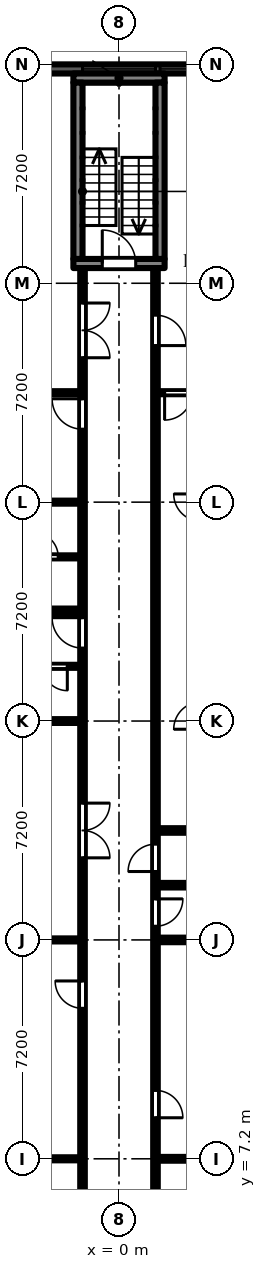
"""IFC4 building model, lengths in metres.
Left out: names, types, materials, properties, quantities, classifications, styles, units other than length and angle.
Written with IfcOpenShell. Run it as: python <this file> out.ifc"""

import sys

from ifc_helpers import new_model, si_unit, direction, frame, frame_2d, origin, place, context, subcontext, project, spatial, rectangle, extrude, element, fill, save


model = new_model("IFC4")
c1 = context("Model", 3, precision=1e-05, world=origin(), true_north=direction((0.0, 1.0)))
c2 = subcontext(c1, "Body", "Model", "MODEL_VIEW")
j1 = project(units=[si_unit("LENGTHUNIT", "METRE"), si_unit("PLANEANGLEUNIT", "RADIAN")], contexts=[c1])
p1 = place(None, origin())
s1 = spatial("IfcSite", under=j1, at=p1, CompositionType="ELEMENT")
p2 = place(p1, origin())
s2 = spatial("IfcBuilding", under=s1, at=p2, CompositionType="ELEMENT")
p3 = place(p2, frame((0.0, 0.0, 44.7)))
s3 = spatial("IfcBuildingStorey", under=s2, at=p3, CompositionType="ELEMENT", Elevation=44.7)
p4 = place(p3, frame((2.7, 43.05, 0.0), z_axis=(0.0, 0.0, 1.0), x_axis=(-1.0, 0.0, 0.0)))
e1 = element("IfcWall", 1, at=p4, inside=s3, PredefinedType="SOLIDWALL", context=c2, shape_type="SweptSolid", body=[
    extrude(rectangle(XDim=5.4, YDim=0.3, at=frame_2d((2.7, 0.0))), origin(), (0.0, 0.0, 1.0), 2.1),
])
p5 = place(p4, frame((1.5, 0.0, 0.2)))
e2 = element("IfcOpeningElement", 2, at=p5, cuts=e1, PredefinedType="OPENING", context=c2, shape_type="SweptSolid", body=[
    extrude(rectangle(XDim=2.4, YDim=1.85, at=frame_2d((1.2, 0.925))), frame((0.0, 0.16, 0.0), z_axis=(0.0, -1.0, 0.0), x_axis=(1.0, 0.0, 0.0)), (0.0, 0.0, 1.0), 0.32),
])
p6 = place(p4, frame((0.15, 0.0, 0.2)))
e3 = element("IfcOpeningElement", 3, at=p6, cuts=e1, PredefinedType="OPENING", context=c2, shape_type="SweptSolid", body=[
    extrude(rectangle(XDim=1.2, YDim=1.85, at=frame_2d((0.6, 0.925))), frame((0.0, 0.16, 0.0), z_axis=(0.0, -1.0, 0.0), x_axis=(1.0, 0.0, 0.0)), (0.0, 0.0, 1.0), 0.32),
])
p7 = place(p3, frame((-1.5, 36.65, 0.0), z_axis=(0.0, 0.0, 1.0), x_axis=(1.0, 0.0, 0.0)))
e4 = element("IfcWall", 4, at=p7, inside=s3, PredefinedType="SHEAR", context=c2, shape_type="SweptSolid", body=[
    extrude(rectangle(XDim=3.0, YDim=0.3, at=frame_2d((1.5, 0.0))), origin(), (0.0, 0.0, 1.0), 2.575),
])
p8 = place(p7, frame((0.95, 0.0, 0.0)))
e5 = element("IfcOpeningElement", 5, at=p8, cuts=e4, PredefinedType="OPENING", context=c2, shape_type="SweptSolid", body=[
    extrude(rectangle(XDim=1.1, YDim=2.1, at=frame_2d((0.55, 1.05))), frame((0.0, 0.16, 0.0), z_axis=(0.0, -1.0, 0.0), x_axis=(1.0, 0.0, 0.0)), (0.0, 0.0, 1.0), 0.32),
])
p9 = place(p3, frame((-1.5, 42.75, 0.0), z_axis=(0.0, 0.0, 1.0), x_axis=(1.0, 0.0, 0.0)))
e6 = element("IfcWall", 6, at=p9, inside=s3, PredefinedType="SHEAR", context=c2, shape_type="SweptSolid", body=[
    extrude(rectangle(XDim=3.0, YDim=0.3, at=frame_2d((1.5, 0.0))), origin(), (0.0, 0.0, 1.0), 2.575),
])
for number, where, z_axis, x_axis in (
    (7, (-1.35, 36.8, 0.0), (0.0, 0.0, 1.0), (0.0, 1.0, 0.0)),
    (8, (1.35, 36.8, 0.0), (0.0, 0.0, 1.0), (0.0, 1.0, 0.0)),
):
    element("IfcWall", number, at=place(p3, frame(where, z_axis=z_axis, x_axis=x_axis)), inside=s3, PredefinedType="SHEAR", context=c2, shape_type="SweptSolid", body=[
        extrude(rectangle(XDim=5.8, YDim=0.3, at=frame_2d((2.9, 0.0))), origin(), (0.0, 0.0, 1.0), 2.575),
    ])
p10 = place(p3, frame((-6.9, 25.2, 0.0), z_axis=(0.0, 0.0, 1.0), x_axis=(1.0, 0.0, 0.0)))
e9 = element("IfcWall", 9, at=p10, inside=s3, PredefinedType="PARTITIONING", context=c2, shape_type="SweptSolid", body=[
    extrude(rectangle(XDim=5.625, YDim=0.2, at=frame_2d((2.812, 0.0))), origin(), (0.0, 0.0, 1.0), 2.575),
])
p11 = place(p3, frame((-6.9, 32.4, 0.0), z_axis=(0.0, 0.0, 1.0), x_axis=(1.0, 0.0, 0.0)))
e10 = element("IfcWall", 10, at=p11, inside=s3, PredefinedType="PARTITIONING", context=c2, shape_type="SweptSolid", body=[
    extrude(rectangle(XDim=5.625, YDim=0.1, at=frame_2d((2.812, 0.0))), origin(), (0.0, 0.0, 1.0), 2.575),
])
for number, where, z_axis, x_axis in (
    (11, (-3.9, 7.2, 0.0), (0.0, 0.0, 1.0), (1.0, 0.0, 0.0)),
    (12, (-3.9, 14.4, 0.0), (0.0, 0.0, 1.0), (1.0, 0.0, 0.0)),
):
    element("IfcWall", number, at=place(p3, frame(where, z_axis=z_axis, x_axis=x_axis)), inside=s3, PredefinedType="PARTITIONING", context=c2, shape_type="SweptSolid", body=[
        extrude(rectangle(XDim=2.625, YDim=0.1, at=frame_2d((1.312, 0.0))), origin(), (0.0, 0.0, 1.0), 2.575),
    ])
p12 = place(p3, frame((-3.55, 27.0, 0.0), z_axis=(0.0, 0.0, 1.0), x_axis=(1.0, 0.0, 0.0)))
e13 = element("IfcWall", 13, at=p12, inside=s3, PredefinedType="PARTITIONING", context=c2, shape_type="SweptSolid", body=[
    extrude(rectangle(XDim=2.275, YDim=0.1, at=frame_2d((1.138, 0.0))), origin(), (0.0, 0.0, 1.0), 2.575),
])
p13 = place(p12, frame((0.75, 0.0, 0.0)))
e14 = element("IfcOpeningElement", 14, at=p13, cuts=e13, PredefinedType="OPENING", context=c2, shape_type="SweptSolid", body=[
    extrude(rectangle(XDim=0.8, YDim=2.1, at=frame_2d((0.4, 1.05))), frame((0.0, 0.06, 0.0), z_axis=(0.0, -1.0, 0.0), x_axis=(1.0, 0.0, 0.0)), (0.0, 0.0, 1.0), 0.12),
])
p14 = place(p3, frame((-3.55, 28.8, 0.0), z_axis=(0.0, 0.0, 1.0), x_axis=(1.0, 0.0, 0.0)))
e15 = element("IfcWall", 15, at=p14, inside=s3, PredefinedType="PARTITIONING", context=c2, shape_type="SweptSolid", body=[
    extrude(rectangle(XDim=2.275, YDim=0.1, at=frame_2d((1.138, 0.0))), origin(), (0.0, 0.0, 1.0), 2.575),
])
p15 = place(p3, frame((-3.0, 21.6, 0.0), z_axis=(0.0, 0.0, 1.0), x_axis=(1.0, 0.0, 0.0)))
e16 = element("IfcWall", 16, at=p15, inside=s3, PredefinedType="PARTITIONING", context=c2, shape_type="SweptSolid", body=[
    extrude(rectangle(XDim=1.725, YDim=0.125, at=frame_2d((0.863, 0.0))), origin(), (0.0, 0.0, 1.0), 2.575),
])
p16 = place(p3, frame((-2.95, 23.4, 0.0), z_axis=(0.0, 0.0, 1.0), x_axis=(1.0, 0.0, 0.0)))
e17 = element("IfcWall", 17, at=p16, inside=s3, PredefinedType="PARTITIONING", context=c2, shape_type="SweptSolid", body=[
    extrude(rectangle(XDim=1.675, YDim=0.1, at=frame_2d((0.837, 0.0))), origin(), (0.0, 0.0, 1.0), 2.575),
])
p17 = place(p16, frame((0.45, 0.0, 0.0)))
e18 = element("IfcOpeningElement", 18, at=p17, cuts=e17, PredefinedType="OPENING", context=c2, shape_type="SweptSolid", body=[
    extrude(rectangle(XDim=0.8, YDim=2.1, at=frame_2d((0.4, 1.05))), frame((0.0, 0.06, 0.0), z_axis=(0.0, -1.0, 0.0), x_axis=(1.0, 0.0, 0.0)), (0.0, 0.0, 1.0), 0.12),
])
p18 = place(p3, frame((-1.2, 1.275, 0.0), z_axis=(0.0, 0.0, 1.0), x_axis=(0.0, 1.0, 0.0)))
e19 = element("IfcWall", 19, at=p18, inside=s3, PredefinedType="PARTITIONING", context=c2, shape_type="SweptSolid", body=[
    extrude(rectangle(XDim=35.225, YDim=0.15, at=frame_2d((17.613, 0.0))), origin(), (0.0, 0.0, 1.0), 2.575),
])
p19 = place(p18, frame((2.475, 0.0, 0.0)))
e20 = element("IfcOpeningElement", 20, at=p19, cuts=e19, PredefinedType="OPENING", context=c2, shape_type="SweptSolid", body=[
    extrude(rectangle(XDim=0.9, YDim=2.1, at=frame_2d((0.45, 1.05))), frame((0.0, 0.085, 0.0), z_axis=(0.0, -1.0, 0.0), x_axis=(1.0, 0.0, 0.0)), (0.0, 0.0, 1.0), 0.17),
])
p20 = place(p18, frame((10.875, 0.0, 0.0)))
e21 = element("IfcOpeningElement", 21, at=p20, cuts=e19, PredefinedType="OPENING", context=c2, shape_type="SweptSolid", body=[
    extrude(rectangle(XDim=0.9, YDim=2.1, at=frame_2d((0.45, 1.05))), frame((0.0, 0.085, 0.0), z_axis=(0.0, -1.0, 0.0), x_axis=(1.0, 0.0, 0.0)), (0.0, 0.0, 1.0), 0.17),
])
p21 = place(p18, frame((15.825, 0.0, 0.0)))
e22 = element("IfcOpeningElement", 22, at=p21, cuts=e19, PredefinedType="OPENING", context=c2, shape_type="SweptSolid", body=[
    extrude(rectangle(XDim=1.8, YDim=2.1, at=frame_2d((0.9, 1.05))), frame((0.0, 0.085, 0.0), z_axis=(0.0, -1.0, 0.0), x_axis=(1.0, 0.0, 0.0)), (0.0, 0.0, 1.0), 0.17),
])
p22 = place(p18, frame((22.725, 0.0, 0.0)))
e23 = element("IfcOpeningElement", 23, at=p22, cuts=e19, PredefinedType="OPENING", context=c2, shape_type="SweptSolid", body=[
    extrude(rectangle(XDim=1.0, YDim=2.1, at=frame_2d((0.5, 1.05))), frame((0.0, 0.085, 0.0), z_axis=(0.0, -1.0, 0.0), x_axis=(1.0, 0.0, 0.0)), (0.0, 0.0, 1.0), 0.17),
])
p23 = place(p18, frame((29.925, 0.0, 0.0)))
e24 = element("IfcOpeningElement", 24, at=p23, cuts=e19, PredefinedType="OPENING", context=c2, shape_type="SweptSolid", body=[
    extrude(rectangle(XDim=1.0, YDim=2.1, at=frame_2d((0.5, 1.05))), frame((0.0, 0.085, 0.0), z_axis=(0.0, -1.0, 0.0), x_axis=(1.0, 0.0, 0.0)), (0.0, 0.0, 1.0), 0.17),
])
p24 = place(p18, frame((32.275, 0.0, 0.0)))
e25 = element("IfcOpeningElement", 25, at=p24, cuts=e19, PredefinedType="OPENING", context=c2, shape_type="SweptSolid", body=[
    extrude(rectangle(XDim=1.8, YDim=2.1, at=frame_2d((0.9, 1.05))), frame((0.0, 0.085, 0.0), z_axis=(0.0, -1.0, 0.0), x_axis=(1.0, 0.0, 0.0)), (0.0, 0.0, 1.0), 0.17),
])
p25 = place(p3, frame((1.2, 1.125, 0.0), z_axis=(0.0, 0.0, 1.0), x_axis=(0.0, 1.0, 0.0)))
e26 = element("IfcWall", 26, at=p25, inside=s3, PredefinedType="PARTITIONING", context=c2, shape_type="SweptSolid", body=[
    extrude(rectangle(XDim=35.375, YDim=0.15, at=frame_2d((17.688, 0.0))), origin(), (0.0, 0.0, 1.0), 2.575),
])
p26 = place(p25, frame((3.825, 0.0, 0.0)))
e27 = element("IfcOpeningElement", 27, at=p26, cuts=e26, PredefinedType="OPENING", context=c2, shape_type="SweptSolid", body=[
    extrude(rectangle(XDim=0.9, YDim=2.1, at=frame_2d((0.45, 1.05))), frame((0.0, 0.085, 0.0), z_axis=(0.0, -1.0, 0.0), x_axis=(1.0, 0.0, 0.0)), (0.0, 0.0, 1.0), 0.17),
])
p27 = place(p25, frame((7.425, 0.0, 0.0)))
e28 = element("IfcOpeningElement", 28, at=p27, cuts=e26, PredefinedType="OPENING", context=c2, shape_type="SweptSolid", body=[
    extrude(rectangle(XDim=0.9, YDim=2.1, at=frame_2d((0.45, 1.05))), frame((0.0, 0.085, 0.0), z_axis=(0.0, -1.0, 0.0), x_axis=(1.0, 0.0, 0.0)), (0.0, 0.0, 1.0), 0.17),
])
p28 = place(p25, frame((13.725, 0.0, 0.0)))
e29 = element("IfcOpeningElement", 29, at=p28, cuts=e26, PredefinedType="OPENING", context=c2, shape_type="SweptSolid", body=[
    extrude(rectangle(XDim=0.9, YDim=2.1, at=frame_2d((0.45, 1.05))), frame((0.0, 0.085, 0.0), z_axis=(0.0, -1.0, 0.0), x_axis=(1.0, 0.0, 0.0)), (0.0, 0.0, 1.0), 0.17),
])
p29 = place(p25, frame((15.525, 0.0, 0.0)))
e30 = element("IfcOpeningElement", 30, at=p29, cuts=e26, PredefinedType="OPENING", context=c2, shape_type="SweptSolid", body=[
    extrude(rectangle(XDim=0.9, YDim=2.1, at=frame_2d((0.45, 1.05))), frame((0.0, 0.085, 0.0), z_axis=(0.0, -1.0, 0.0), x_axis=(1.0, 0.0, 0.0)), (0.0, 0.0, 1.0), 0.17),
])
p30 = place(p25, frame((32.825, 0.0, 0.0)))
e31 = element("IfcOpeningElement", 31, at=p30, cuts=e26, PredefinedType="OPENING", context=c2, shape_type="SweptSolid", body=[
    extrude(rectangle(XDim=1.0, YDim=2.1, at=frame_2d((0.5, 1.05))), frame((0.0, 0.085, 0.0), z_axis=(0.0, -1.0, 0.0), x_axis=(1.0, 0.0, 0.0)), (0.0, 0.0, 1.0), 0.17),
])
p31 = place(p3, frame((1.275, 7.2, 0.0), z_axis=(0.0, 0.0, 1.0), x_axis=(1.0, 0.0, 0.0)))
e32 = element("IfcWall", 32, at=p31, inside=s3, PredefinedType="PARTITIONING", context=c2, shape_type="SweptSolid", body=[
    extrude(rectangle(XDim=2.625, YDim=0.125, at=frame_2d((1.312, 0.0))), origin(), (0.0, 0.0, 1.0), 2.575),
])
p32 = place(p3, frame((1.275, 14.4, 0.0), z_axis=(0.0, 0.0, 1.0), x_axis=(1.0, 0.0, 0.0)))
e33 = element("IfcWall", 33, at=p32, inside=s3, PredefinedType="PARTITIONING", context=c2, shape_type="SweptSolid", body=[
    extrude(rectangle(XDim=2.625, YDim=0.15, at=frame_2d((1.312, 0.0))), origin(), (0.0, 0.0, 1.0), 2.575),
])
for number, where, z_axis, x_axis in (
    (34, (1.275, 16.2, 0.0), (0.0, 0.0, 1.0), (1.0, 0.0, 0.0)),
    (35, (1.275, 18.0, 0.0), (0.0, 0.0, 1.0), (1.0, 0.0, 0.0)),
):
    element("IfcWall", number, at=place(p3, frame(where, z_axis=z_axis, x_axis=x_axis)), inside=s3, PredefinedType="PARTITIONING", context=c2, shape_type="SweptSolid", body=[
        extrude(rectangle(XDim=5.625, YDim=0.15, at=frame_2d((2.812, 0.0))), origin(), (0.0, 0.0, 1.0), 2.575),
    ])
p33 = place(p3, frame((1.275, 32.4, 0.0), z_axis=(0.0, 0.0, 1.0), x_axis=(1.0, 0.0, 0.0)))
e36 = element("IfcWall", 36, at=p33, inside=s3, PredefinedType="PARTITIONING", context=c2, shape_type="SweptSolid", body=[
    extrude(rectangle(XDim=5.625, YDim=0.1, at=frame_2d((2.812, 0.0))), origin(), (0.0, 0.0, 1.0), 2.575),
])
p34 = place(p33, frame((0.225, 0.0, 0.0)))
e37 = element("IfcOpeningElement", 37, at=p34, cuts=e36, PredefinedType="OPENING", context=c2, shape_type="SweptSolid", body=[
    extrude(rectangle(XDim=0.9, YDim=2.1, at=frame_2d((0.45, 1.05))), frame((0.0, 0.06, 0.0), z_axis=(0.0, -1.0, 0.0), x_axis=(1.0, 0.0, 0.0)), (0.0, 0.0, 1.0), 0.12),
])
p35 = place(p5, origin())
e38 = element("IfcWindow", 38, at=p35, inside=s3, PartitioningType="SINGLE_PANEL", PredefinedType="WINDOW", context=c2, shape_type="SweptSolid", body=[
    extrude(rectangle(XDim=2.4, YDim=1.85, at=frame_2d((1.2, 0.925))), frame((0.0, 0.03, 0.0), z_axis=(0.0, -1.0, 0.0), x_axis=(1.0, 0.0, 0.0)), (0.0, 0.0, 1.0), 0.06),
])
fill(e2, e38)
p36 = place(p6, origin())
e39 = element("IfcWindow", 39, at=p36, inside=s3, PartitioningType="SINGLE_PANEL", PredefinedType="WINDOW", context=c2, shape_type="SweptSolid", body=[
    extrude(rectangle(XDim=1.2, YDim=1.85, at=frame_2d((0.6, 0.925))), frame((0.0, 0.03, 0.0), z_axis=(0.0, -1.0, 0.0), x_axis=(1.0, 0.0, 0.0)), (0.0, 0.0, 1.0), 0.06),
])
fill(e3, e39)
p37 = place(p8, origin())
e40 = element("IfcDoor", 40, at=p37, inside=s3, OperationType="SINGLE_SWING_LEFT", PredefinedType="DOOR", context=c2, shape_type="SweptSolid", body=[
    extrude(rectangle(XDim=1.1, YDim=2.1, at=frame_2d((0.55, 1.05))), frame((0.0, 0.025, 0.0), z_axis=(0.0, -1.0, 0.0), x_axis=(1.0, 0.0, 0.0)), (0.0, 0.0, 1.0), 0.05),
])
fill(e5, e40)
p38 = place(p20, origin())
e41 = element("IfcDoor", 41, at=p38, inside=s3, OperationType="SINGLE_SWING_RIGHT", PredefinedType="DOOR", context=c2, shape_type="SweptSolid", body=[
    extrude(rectangle(XDim=0.9, YDim=2.1, at=frame_2d((0.45, 1.05))), frame((0.0, 0.025, 0.0), z_axis=(0.0, -1.0, 0.0), x_axis=(1.0, 0.0, 0.0)), (0.0, 0.0, 1.0), 0.05),
])
fill(e21, e41)
p39 = place(p21, frame((1.8, 0.0, 0.0), z_axis=(0.0, 0.0, 1.0), x_axis=(-1.0, 0.0, 0.0)))
e42 = element("IfcDoor", 42, at=p39, inside=s3, OperationType="DOUBLE_DOOR_DOUBLE_SWING", PredefinedType="DOOR", context=c2, shape_type="SweptSolid", body=[
    extrude(rectangle(XDim=1.8, YDim=2.1, at=frame_2d((0.9, 1.05))), frame((0.0, 0.025, 0.0), z_axis=(0.0, -1.0, 0.0), x_axis=(1.0, 0.0, 0.0)), (0.0, 0.0, 1.0), 0.05),
])
fill(e22, e42)
p40 = place(p17, frame((0.8, 0.0, 0.0), z_axis=(0.0, 0.0, 1.0), x_axis=(-1.0, 0.0, 0.0)))
e43 = element("IfcDoor", 43, at=p40, inside=s3, OperationType="SINGLE_SWING_LEFT", PredefinedType="DOOR", context=c2, shape_type="SweptSolid", body=[
    extrude(rectangle(XDim=0.8, YDim=2.1, at=frame_2d((0.4, 1.05))), frame((0.0, 0.025, 0.0), z_axis=(0.0, -1.0, 0.0), x_axis=(1.0, 0.0, 0.0)), (0.0, 0.0, 1.0), 0.05),
])
fill(e18, e43)
p41 = place(p22, origin())
e44 = element("IfcDoor", 44, at=p41, inside=s3, OperationType="SINGLE_SWING_RIGHT", PredefinedType="DOOR", context=c2, shape_type="SweptSolid", body=[
    extrude(rectangle(XDim=1.0, YDim=2.1, at=frame_2d((0.5, 1.05))), frame((0.0, 0.025, 0.0), z_axis=(0.0, -1.0, 0.0), x_axis=(1.0, 0.0, 0.0)), (0.0, 0.0, 1.0), 0.05),
])
fill(e23, e44)
p42 = place(p13, origin())
e45 = element("IfcDoor", 45, at=p42, inside=s3, OperationType="SINGLE_SWING_LEFT", PredefinedType="DOOR", context=c2, shape_type="SweptSolid", body=[
    extrude(rectangle(XDim=0.8, YDim=2.1, at=frame_2d((0.4, 1.05))), frame((0.0, 0.025, 0.0), z_axis=(0.0, -1.0, 0.0), x_axis=(1.0, 0.0, 0.0)), (0.0, 0.0, 1.0), 0.05),
])
fill(e14, e45)
p43 = place(p23, origin())
e46 = element("IfcDoor", 46, at=p43, inside=s3, OperationType="SINGLE_SWING_RIGHT", PredefinedType="DOOR", context=c2, shape_type="SweptSolid", body=[
    extrude(rectangle(XDim=1.0, YDim=2.1, at=frame_2d((0.5, 1.05))), frame((0.0, 0.025, 0.0), z_axis=(0.0, -1.0, 0.0), x_axis=(1.0, 0.0, 0.0)), (0.0, 0.0, 1.0), 0.05),
])
fill(e24, e46)
p44 = place(p24, frame((1.8, 0.0, 0.0), z_axis=(0.0, 0.0, 1.0), x_axis=(-1.0, 0.0, 0.0)))
e47 = element("IfcDoor", 47, at=p44, inside=s3, OperationType="DOUBLE_DOOR_DOUBLE_SWING", PredefinedType="DOOR", context=c2, shape_type="SweptSolid", body=[
    extrude(rectangle(XDim=1.8, YDim=2.1, at=frame_2d((0.9, 1.05))), frame((0.0, 0.025, 0.0), z_axis=(0.0, -1.0, 0.0), x_axis=(1.0, 0.0, 0.0)), (0.0, 0.0, 1.0), 0.05),
])
fill(e25, e47)
p45 = place(p27, frame((0.9, 0.0, 0.0), z_axis=(0.0, 0.0, 1.0), x_axis=(-1.0, 0.0, 0.0)))
e48 = element("IfcDoor", 48, at=p45, inside=s3, OperationType="SINGLE_SWING_RIGHT", PredefinedType="DOOR", context=c2, shape_type="SweptSolid", body=[
    extrude(rectangle(XDim=0.9, YDim=2.1, at=frame_2d((0.45, 1.05))), frame((0.0, 0.025, 0.0), z_axis=(0.0, -1.0, 0.0), x_axis=(1.0, 0.0, 0.0)), (0.0, 0.0, 1.0), 0.05),
])
fill(e28, e48)
p46 = place(p28, frame((0.9, 0.0, 0.0), z_axis=(0.0, 0.0, 1.0), x_axis=(-1.0, 0.0, 0.0)))
e49 = element("IfcDoor", 49, at=p46, inside=s3, OperationType="SINGLE_SWING_LEFT", PredefinedType="DOOR", context=c2, shape_type="SweptSolid", body=[
    extrude(rectangle(XDim=0.9, YDim=2.1, at=frame_2d((0.45, 1.05))), frame((0.0, 0.025, 0.0), z_axis=(0.0, -1.0, 0.0), x_axis=(1.0, 0.0, 0.0)), (0.0, 0.0, 1.0), 0.05),
])
fill(e29, e49)
p47 = place(p29, origin())
e50 = element("IfcDoor", 50, at=p47, inside=s3, OperationType="SINGLE_SWING_LEFT", PredefinedType="DOOR", context=c2, shape_type="SweptSolid", body=[
    extrude(rectangle(XDim=0.9, YDim=2.1, at=frame_2d((0.45, 1.05))), frame((0.0, 0.025, 0.0), z_axis=(0.0, -1.0, 0.0), x_axis=(1.0, 0.0, 0.0)), (0.0, 0.0, 1.0), 0.05),
])
fill(e30, e50)
p48 = place(p30, frame((1.0, 0.0, 0.0), z_axis=(0.0, 0.0, 1.0), x_axis=(-1.0, 0.0, 0.0)))
e51 = element("IfcDoor", 51, at=p48, inside=s3, OperationType="SINGLE_SWING_RIGHT", PredefinedType="DOOR", context=c2, shape_type="SweptSolid", body=[
    extrude(rectangle(XDim=1.0, YDim=2.1, at=frame_2d((0.5, 1.05))), frame((0.0, 0.025, 0.0), z_axis=(0.0, -1.0, 0.0), x_axis=(1.0, 0.0, 0.0)), (0.0, 0.0, 1.0), 0.05),
])
fill(e31, e51)
p49 = place(p34, frame((0.9, 0.0, 0.0), z_axis=(0.0, 0.0, 1.0), x_axis=(-1.0, 0.0, 0.0)))
e52 = element("IfcDoor", 52, at=p49, inside=s3, OperationType="SINGLE_SWING_RIGHT", PredefinedType="DOOR", context=c2, shape_type="SweptSolid", body=[
    extrude(rectangle(XDim=0.9, YDim=2.1, at=frame_2d((0.45, 1.05))), frame((0.0, 0.025, 0.0), z_axis=(0.0, -1.0, 0.0), x_axis=(1.0, 0.0, 0.0)), (0.0, 0.0, 1.0), 0.05),
])
fill(e37, e52)
save(model, sys.argv[1])
